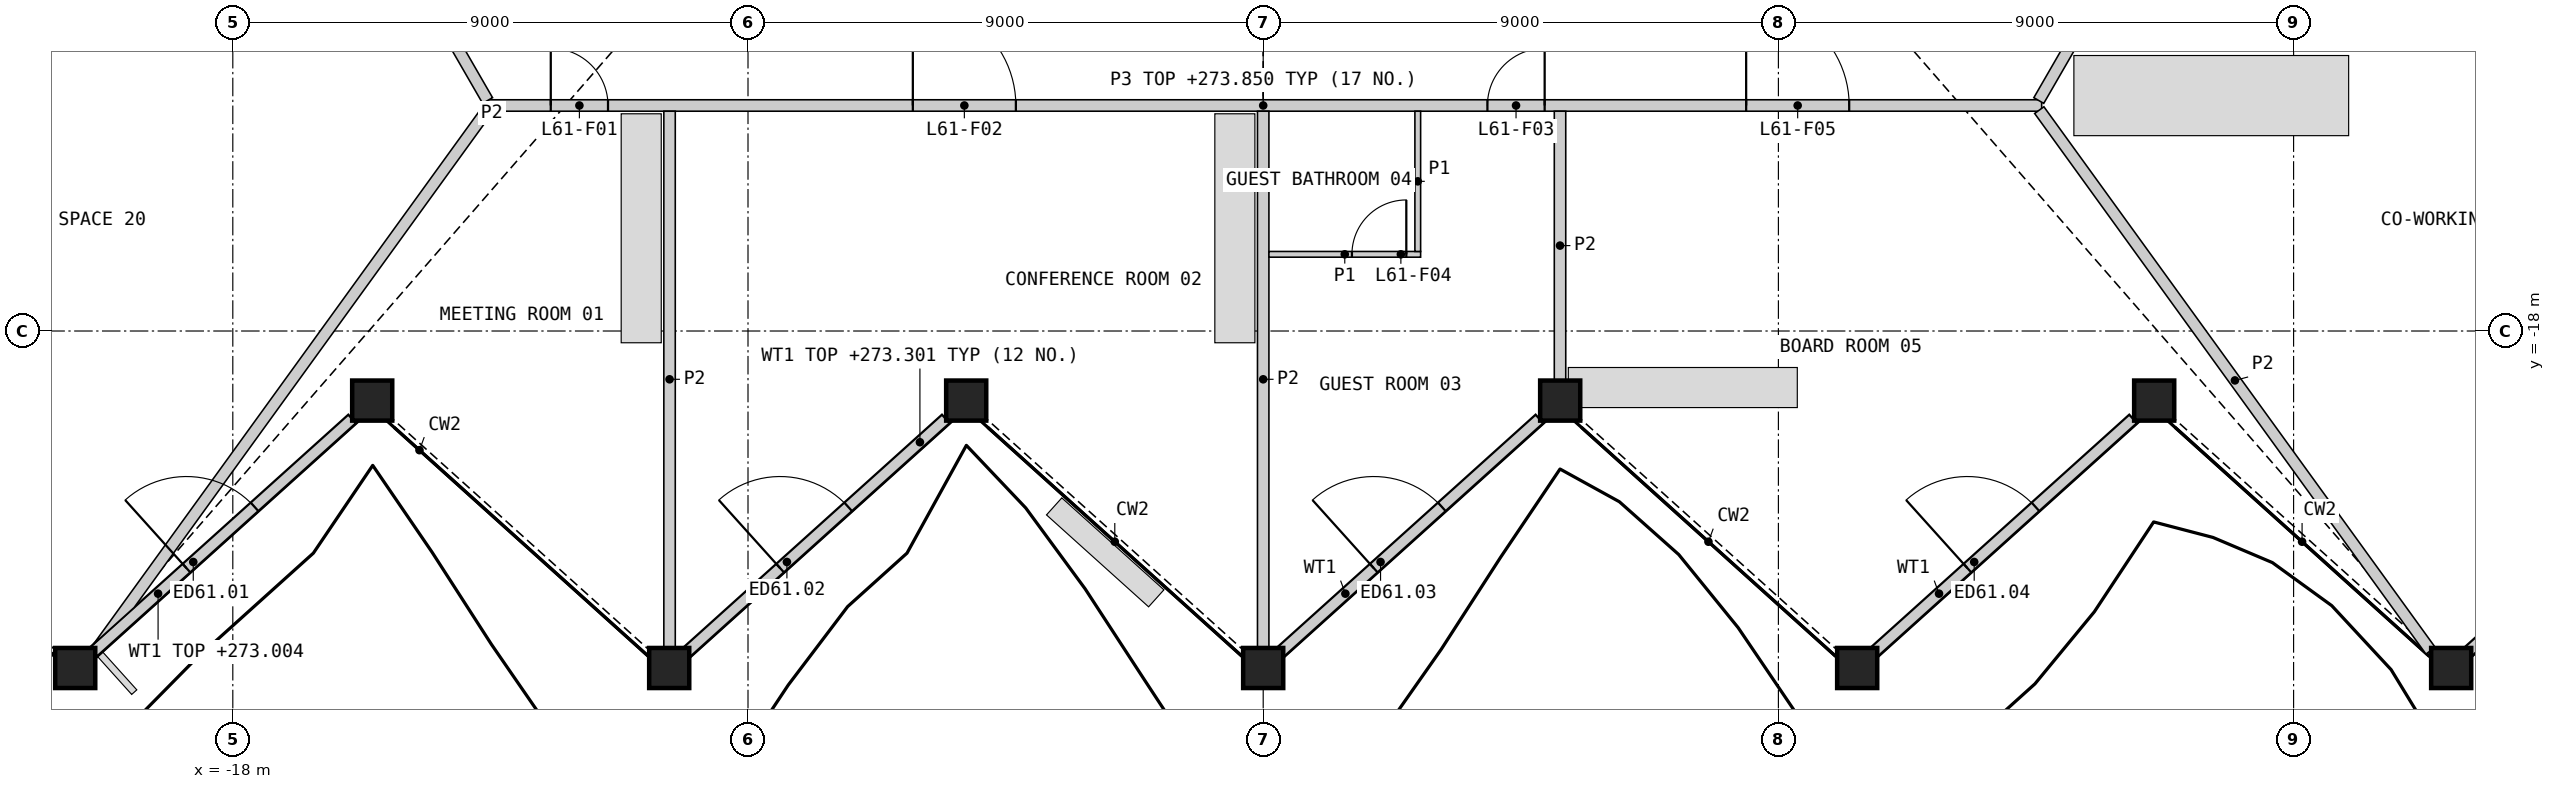
"""IFC4 building model, lengths in metres.
Left out: names, types, materials, properties, quantities, classifications, styles, units other than length and angle.
Written with IfcOpenShell. Run it as: python <this file> out.ifc"""

import sys

from ifc_helpers import new_model, si_unit, direction, frame, frame_2d, origin, origin_2d, place, context, subcontext, project, spatial, polyline, rectangle, hollow_rectangle, outline, extrude, element, fill, save


model = new_model("IFC4")
c1 = context("Model", 3, precision=1e-05, world=origin(), true_north=direction((0.0, 1.0)))
c2 = subcontext(c1, "Body", "Model", "MODEL_VIEW")
j1 = project(units=[si_unit("LENGTHUNIT", "METRE"), si_unit("PLANEANGLEUNIT", "RADIAN")], contexts=[c1])
p1 = place(None, origin())
s1 = spatial("IfcSite", under=j1, at=p1, CompositionType="ELEMENT")
p2 = place(p1, origin())
s2 = spatial("IfcBuilding", under=s1, at=p2, CompositionType="ELEMENT")
p3 = place(p2, frame((0.0, 0.0, 270.6)))
s3 = spatial("IfcBuildingStorey", under=s2, at=p3, CompositionType="ELEMENT", Elevation=270.6)
for number, where, z_axis, x_axis in (
    (1, (-20.753, -23.887, 0.0), (0.0, 0.0, 1.0), (1.0, 0.0, 0.0)),
    (2, (-15.565, -19.215, 0.0), (0.0, 0.0, 1.0), (1.0, 0.0, 0.0)),
    (3, (-10.376, -23.887, 0.0), (0.0, 0.0, 1.0), (1.0, 0.0, 0.0)),
    (4, (-5.188, -19.215, 0.0), (0.0, 0.0, 1.0), (1.0, 0.0, 0.0)),
    (5, (0.0, -23.887, 0.0), (0.0, 0.0, 1.0), (1.0, 0.0, 0.0)),
    (6, (5.188, -19.215, 0.0), (0.0, 0.0, 1.0), (1.0, 0.0, 0.0)),
    (7, (10.376, -23.887, 0.0), (0.0, 0.0, 1.0), (1.0, 0.0, 0.0)),
    (8, (15.565, -19.215, 0.0), (0.0, 0.0, 1.0), (1.0, 0.0, 0.0)),
    (9, (20.753, -23.887, 0.0), (0.0, 0.0, 1.0), (1.0, 0.0, 0.0)),
):
    element("IfcColumn", number, at=place(p3, frame(where, z_axis=z_axis, x_axis=x_axis)), inside=s3, PredefinedType="COLUMN", context=c2, shape_type="SweptSolid", body=[
        extrude(hollow_rectangle(XDim=0.7, YDim=0.7, WallThickness=0.045, at=origin_2d()), origin(), (0.0, 0.0, 1.0), 3.6),
    ])
p4 = place(p3, frame((-20.436, -23.606, 0.0), z_axis=(0.0, 0.0, 1.0), x_axis=(0.743162414049, 0.669111071755, 0.0)))
e10 = element("IfcWall", 10, at=p4, inside=s3, PredefinedType="SOLIDWALL", context=c2, shape_type="SweptSolid", body=[
    extrude(rectangle(XDim=6.083, YDim=0.2, at=frame_2d((3.042, 0.0))), origin(), (0.0, 0.0, 1.0), 2.404),
])
p5 = place(p4, frame((2.188, 0.0, 0.0)))
e11 = element("IfcOpeningElement", 11, at=p5, cuts=e10, PredefinedType="OPENING", context=c2, shape_type="SweptSolid", body=[
    extrude(rectangle(XDim=1.6, YDim=2.4, at=frame_2d((0.8, 1.2))), frame((0.0, 0.11, 0.0), z_axis=(0.0, -1.0, 0.0), x_axis=(1.0, 0.0, 0.0)), (0.0, 0.0, 1.0), 0.22),
])
p6 = place(p3, frame((-10.065, -23.606, 0.0), z_axis=(0.0, 0.0, 1.0), x_axis=(0.743144443869, 0.669131030178, 0.0)))
e12 = element("IfcWall", 12, at=p6, inside=s3, PredefinedType="SOLIDWALL", context=c2, shape_type="SweptSolid", body=[
    extrude(rectangle(XDim=6.083, YDim=0.2, at=frame_2d((3.041, 0.0))), origin(), (0.0, 0.0, 1.0), 2.701),
])
p7 = place(p6, frame((2.188, 0.0, 0.0)))
e13 = element("IfcOpeningElement", 13, at=p7, cuts=e12, PredefinedType="OPENING", context=c2, shape_type="SweptSolid", body=[
    extrude(rectangle(XDim=1.6, YDim=2.4, at=frame_2d((0.8, 1.2))), frame((0.0, 0.11, 0.0), z_axis=(0.0, -1.0, 0.0), x_axis=(1.0, 0.0, 0.0)), (0.0, 0.0, 1.0), 0.22),
])
p8 = place(p3, frame((0.305, -23.606, 0.0), z_axis=(0.0, 0.0, 1.0), x_axis=(0.743144443869, 0.669131030178, 0.0)))
e14 = element("IfcWall", 14, at=p8, inside=s3, PredefinedType="SOLIDWALL", context=c2, shape_type="SweptSolid", body=[
    extrude(rectangle(XDim=6.083, YDim=0.2, at=frame_2d((3.041, 0.0))), origin(), (0.0, 0.0, 1.0), 2.701),
])
p9 = place(p8, frame((2.188, 0.0, 0.0)))
e15 = element("IfcOpeningElement", 15, at=p9, cuts=e14, PredefinedType="OPENING", context=c2, shape_type="SweptSolid", body=[
    extrude(rectangle(XDim=1.6, YDim=2.4, at=frame_2d((0.8, 1.2))), frame((0.0, 0.11, 0.0), z_axis=(0.0, -1.0, 0.0), x_axis=(1.0, 0.0, 0.0)), (0.0, 0.0, 1.0), 0.22),
])
p10 = place(p3, frame((10.676, -23.606, 0.0), z_axis=(0.0, 0.0, 1.0), x_axis=(0.743144443869, 0.669131030178, 0.0)))
e16 = element("IfcWall", 16, at=p10, inside=s3, PredefinedType="SOLIDWALL", context=c2, shape_type="SweptSolid", body=[
    extrude(rectangle(XDim=6.083, YDim=0.2, at=frame_2d((3.041, 0.0))), origin(), (0.0, 0.0, 1.0), 2.701),
])
p11 = place(p10, frame((2.188, 0.0, 0.0)))
e17 = element("IfcOpeningElement", 17, at=p11, cuts=e16, PredefinedType="OPENING", context=c2, shape_type="SweptSolid", body=[
    extrude(rectangle(XDim=1.6, YDim=2.4, at=frame_2d((0.8, 1.2))), frame((0.0, 0.11, 0.0), z_axis=(0.0, -1.0, 0.0), x_axis=(1.0, 0.0, 0.0)), (0.0, 0.0, 1.0), 0.22),
])
p12 = place(p3, frame((21.046, -23.606, 0.0), z_axis=(0.0, 0.0, 1.0), x_axis=(0.743162414049, 0.669111071755, 0.0)))
e18 = element("IfcWall", 18, at=p12, inside=s3, PredefinedType="SOLIDWALL", context=c2, shape_type="SweptSolid", body=[
    extrude(rectangle(XDim=6.083, YDim=0.2, at=frame_2d((3.042, 0.0))), origin(), (0.0, 0.0, 1.0), 2.701),
])
p13 = place(p12, frame((2.188, 0.0, 0.0)))
e19 = element("IfcOpeningElement", 19, at=p13, cuts=e18, PredefinedType="OPENING", context=c2, shape_type="SweptSolid", body=[
    extrude(rectangle(XDim=1.6, YDim=2.4, at=frame_2d((0.8, 1.2))), frame((0.0, 0.11, 0.0), z_axis=(0.0, -1.0, 0.0), x_axis=(1.0, 0.0, 0.0)), (0.0, 0.0, 1.0), 0.22),
])
p14 = place(p3, frame((-13.599, -14.06, 0.0), z_axis=(0.0, 0.0, 1.0), x_axis=(1.0, 0.0, 0.0)))
e20 = element("IfcWall", 20, at=p14, inside=s3, PredefinedType="PARTITIONING", context=c2, shape_type="SweptSolid", body=[
    extrude(rectangle(XDim=27.198, YDim=0.2, at=frame_2d((13.599, 0.0))), origin(), (0.0, 0.0, 1.0), 3.25),
])
p15 = place(p14, frame((1.153, 0.0, 0.0)))
e21 = element("IfcOpeningElement", 21, at=p15, cuts=e20, PredefinedType="OPENING", context=c2, shape_type="SweptSolid", body=[
    extrude(rectangle(XDim=1.0, YDim=2.1, at=frame_2d((0.5, 1.05))), frame((0.0, 0.11, 0.0), z_axis=(0.0, -1.0, 0.0), x_axis=(1.0, 0.0, 0.0)), (0.0, 0.0, 1.0), 0.22),
])
p16 = place(p14, frame((7.478, 0.0, 0.0)))
e22 = element("IfcOpeningElement", 22, at=p16, cuts=e20, PredefinedType="OPENING", context=c2, shape_type="SweptSolid", body=[
    extrude(rectangle(XDim=1.8, YDim=2.1, at=frame_2d((0.9, 1.05))), frame((0.0, 0.11, 0.0), z_axis=(0.0, -1.0, 0.0), x_axis=(1.0, 0.0, 0.0)), (0.0, 0.0, 1.0), 0.22),
])
p17 = place(p14, frame((17.516, 0.0, 0.0)))
e23 = element("IfcOpeningElement", 23, at=p17, cuts=e20, PredefinedType="OPENING", context=c2, shape_type="SweptSolid", body=[
    extrude(rectangle(XDim=1.0, YDim=2.1, at=frame_2d((0.5, 1.05))), frame((0.0, 0.11, 0.0), z_axis=(0.0, -1.0, 0.0), x_axis=(1.0, 0.0, 0.0)), (0.0, 0.0, 1.0), 0.22),
])
p18 = place(p14, frame((22.036, 0.0, 0.0)))
e24 = element("IfcOpeningElement", 24, at=p18, cuts=e20, PredefinedType="OPENING", context=c2, shape_type="SweptSolid", body=[
    extrude(rectangle(XDim=1.8, YDim=2.1, at=frame_2d((0.9, 1.05))), frame((0.0, 0.11, 0.0), z_axis=(0.0, -1.0, 0.0), x_axis=(1.0, 0.0, 0.0)), (0.0, 0.0, 1.0), 0.22),
])
for number, where, z_axis, x_axis in (
    (25, (13.549, -13.974, 0.0), (0.0, 0.0, 1.0), (0.5, 0.866, 0.0)),
    (26, (-15.05, -11.374, 0.0), (0.0, 0.0, 1.0), (0.5, -0.866, 0.0)),
):
    element("IfcWall", number, at=place(p3, frame(where, z_axis=z_axis, x_axis=x_axis)), inside=s3, PredefinedType="PARTITIONING", context=c2, shape_type="SweptSolid", body=[
        extrude(rectangle(XDim=3.002, YDim=0.2, at=frame_2d((1.501, 0.0))), origin(), (0.0, 0.0, 1.0), 3.25),
    ])
p19 = place(p3, frame((13.557, -14.141, 0.0), z_axis=(0.0, 0.0, 1.0), x_axis=(0.586363418846, -0.810048110324, 0.0)))
e27 = element("IfcWall", 27, at=p19, inside=s3, PredefinedType="PARTITIONING", context=c2, shape_type="SweptSolid", body=[
    extrude(rectangle(XDim=11.658, YDim=0.2, at=frame_2d((5.829, 0.0))), origin(), (0.0, 0.0, 1.0), 2.404),
])
p20 = place(p3, origin())
e28 = element("IfcWall", 28, at=p20, inside=s3, PredefinedType="PARTITIONING", context=c2, shape_type="SweptSolid", body=[
    extrude(outline(polyline([(-13.476, -14.2), (-19.723, -22.83), (-20.432, -23.468), (-13.638, -14.083), (-13.476, -14.2)])), origin(), (0.0, 0.0, 1.0), 2.404),
])
for number, where, z_axis, x_axis in (
    (29, (-10.37, -23.527, 0.0), (0.0, 0.0, 1.0), (0.0, 1.0, 0.0)),
    (30, (0.0, -23.527, 0.0), (0.0, 0.0, 1.0), (0.0, 1.0, 0.0)),
):
    element("IfcWall", number, at=place(p3, frame(where, z_axis=z_axis, x_axis=x_axis)), inside=s3, PredefinedType="PARTITIONING", context=c2, shape_type="SweptSolid", body=[
        extrude(rectangle(XDim=9.366, YDim=0.2, at=frame_2d((4.683, 0.0))), origin(), (0.0, 0.0, 1.0), 2.404),
    ])
p21 = place(p3, frame((5.185, -18.855, 0.0), z_axis=(0.0, 0.0, 1.0), x_axis=(0.0, 1.0, 0.0)))
e31 = element("IfcWall", 31, at=p21, inside=s3, PredefinedType="PARTITIONING", context=c2, shape_type="SweptSolid", body=[
    extrude(rectangle(XDim=4.695, YDim=0.2, at=frame_2d((2.348, 0.0))), origin(), (0.0, 0.0, 1.0), 2.404),
])
p22 = place(p3, frame((0.1, -16.66, 0.0), z_axis=(0.0, 0.0, 1.0), x_axis=(1.0, 0.0, 0.0)))
e32 = element("IfcWall", 32, at=p22, inside=s3, PredefinedType="PARTITIONING", context=c2, shape_type="SweptSolid", body=[
    extrude(rectangle(XDim=2.65, YDim=0.1, at=frame_2d((1.325, 0.0))), origin(), (0.0, 0.0, 1.0), 2.404),
])
p23 = place(p22, frame((1.45, 0.0, 0.0)))
e33 = element("IfcOpeningElement", 33, at=p23, cuts=e32, PredefinedType="OPENING", context=c2, shape_type="SweptSolid", body=[
    extrude(rectangle(XDim=0.95, YDim=2.1, at=frame_2d((0.475, 1.05))), frame((0.0, 0.06, 0.0), z_axis=(0.0, -1.0, 0.0), x_axis=(1.0, 0.0, 0.0)), (0.0, 0.0, 1.0), 0.12),
])
p24 = place(p3, frame((2.7, -16.61, 0.0), z_axis=(0.0, 0.0, 1.0), x_axis=(0.0, 1.0, 0.0)))
e34 = element("IfcWall", 34, at=p24, inside=s3, PredefinedType="PARTITIONING", context=c2, shape_type="SweptSolid", body=[
    extrude(rectangle(XDim=2.45, YDim=0.1, at=frame_2d((1.225, 0.0))), origin(), (0.0, 0.0, 1.0), 2.404),
])
p25 = place(p5, origin())
e35 = element("IfcDoor", 35, at=p25, inside=s3, OperationType="DOUBLE_DOOR_SINGLE_SWING", PredefinedType="DOOR", context=c2, shape_type="SweptSolid", body=[
    extrude(rectangle(XDim=1.6, YDim=2.4, at=frame_2d((0.8, 1.2))), frame((0.0, 0.025, 0.0), z_axis=(0.0, -1.0, 0.0), x_axis=(1.0, 0.0, 0.0)), (0.0, 0.0, 1.0), 0.05),
])
fill(e11, e35)
p26 = place(p7, origin())
e36 = element("IfcDoor", 36, at=p26, inside=s3, OperationType="DOUBLE_DOOR_SINGLE_SWING", PredefinedType="DOOR", context=c2, shape_type="SweptSolid", body=[
    extrude(rectangle(XDim=1.6, YDim=2.4, at=frame_2d((0.8, 1.2))), frame((0.0, 0.025, 0.0), z_axis=(0.0, -1.0, 0.0), x_axis=(1.0, 0.0, 0.0)), (0.0, 0.0, 1.0), 0.05),
])
fill(e13, e36)
p27 = place(p9, origin())
e37 = element("IfcDoor", 37, at=p27, inside=s3, OperationType="DOUBLE_DOOR_SINGLE_SWING", PredefinedType="DOOR", context=c2, shape_type="SweptSolid", body=[
    extrude(rectangle(XDim=1.6, YDim=2.4, at=frame_2d((0.8, 1.2))), frame((0.0, 0.025, 0.0), z_axis=(0.0, -1.0, 0.0), x_axis=(1.0, 0.0, 0.0)), (0.0, 0.0, 1.0), 0.05),
])
fill(e15, e37)
p28 = place(p11, origin())
e38 = element("IfcDoor", 38, at=p28, inside=s3, OperationType="DOUBLE_DOOR_SINGLE_SWING", PredefinedType="DOOR", context=c2, shape_type="SweptSolid", body=[
    extrude(rectangle(XDim=1.6, YDim=2.4, at=frame_2d((0.8, 1.2))), frame((0.0, 0.025, 0.0), z_axis=(0.0, -1.0, 0.0), x_axis=(1.0, 0.0, 0.0)), (0.0, 0.0, 1.0), 0.05),
])
fill(e17, e38)
p29 = place(p15, origin())
e39 = element("IfcDoor", 39, at=p29, inside=s3, OperationType="SINGLE_SWING_LEFT", PredefinedType="DOOR", context=c2, shape_type="SweptSolid", body=[
    extrude(rectangle(XDim=1.0, YDim=2.1, at=frame_2d((0.5, 1.05))), frame((0.0, 0.025, 0.0), z_axis=(0.0, -1.0, 0.0), x_axis=(1.0, 0.0, 0.0)), (0.0, 0.0, 1.0), 0.05),
])
fill(e21, e39)
p30 = place(p16, origin())
e40 = element("IfcDoor", 40, at=p30, inside=s3, OperationType="DOUBLE_DOOR_SINGLE_SWING", PredefinedType="DOOR", context=c2, shape_type="SweptSolid", body=[
    extrude(rectangle(XDim=1.8, YDim=2.1, at=frame_2d((0.9, 1.05))), frame((0.0, 0.025, 0.0), z_axis=(0.0, -1.0, 0.0), x_axis=(1.0, 0.0, 0.0)), (0.0, 0.0, 1.0), 0.05),
])
fill(e22, e40)
p31 = place(p17, origin())
e41 = element("IfcDoor", 41, at=p31, inside=s3, OperationType="SINGLE_SWING_RIGHT", PredefinedType="DOOR", context=c2, shape_type="SweptSolid", body=[
    extrude(rectangle(XDim=1.0, YDim=2.1, at=frame_2d((0.5, 1.05))), frame((0.0, 0.025, 0.0), z_axis=(0.0, -1.0, 0.0), x_axis=(1.0, 0.0, 0.0)), (0.0, 0.0, 1.0), 0.05),
])
fill(e23, e41)
p32 = place(p23, origin())
e42 = element("IfcDoor", 42, at=p32, inside=s3, OperationType="SINGLE_SWING_RIGHT", PredefinedType="DOOR", context=c2, shape_type="SweptSolid", body=[
    extrude(rectangle(XDim=0.95, YDim=2.1, at=frame_2d((0.475, 1.05))), frame((0.0, 0.025, 0.0), z_axis=(0.0, -1.0, 0.0), x_axis=(1.0, 0.0, 0.0)), (0.0, 0.0, 1.0), 0.05),
])
fill(e33, e42)
p33 = place(p18, origin())
e43 = element("IfcDoor", 43, at=p33, inside=s3, OperationType="DOUBLE_DOOR_SINGLE_SWING", PredefinedType="DOOR", context=c2, shape_type="SweptSolid", body=[
    extrude(rectangle(XDim=1.8, YDim=2.1, at=frame_2d((0.9, 1.05))), frame((0.0, 0.025, 0.0), z_axis=(0.0, -1.0, 0.0), x_axis=(1.0, 0.0, 0.0)), (0.0, 0.0, 1.0), 0.05),
])
fill(e24, e43)
save(model, sys.argv[1])
